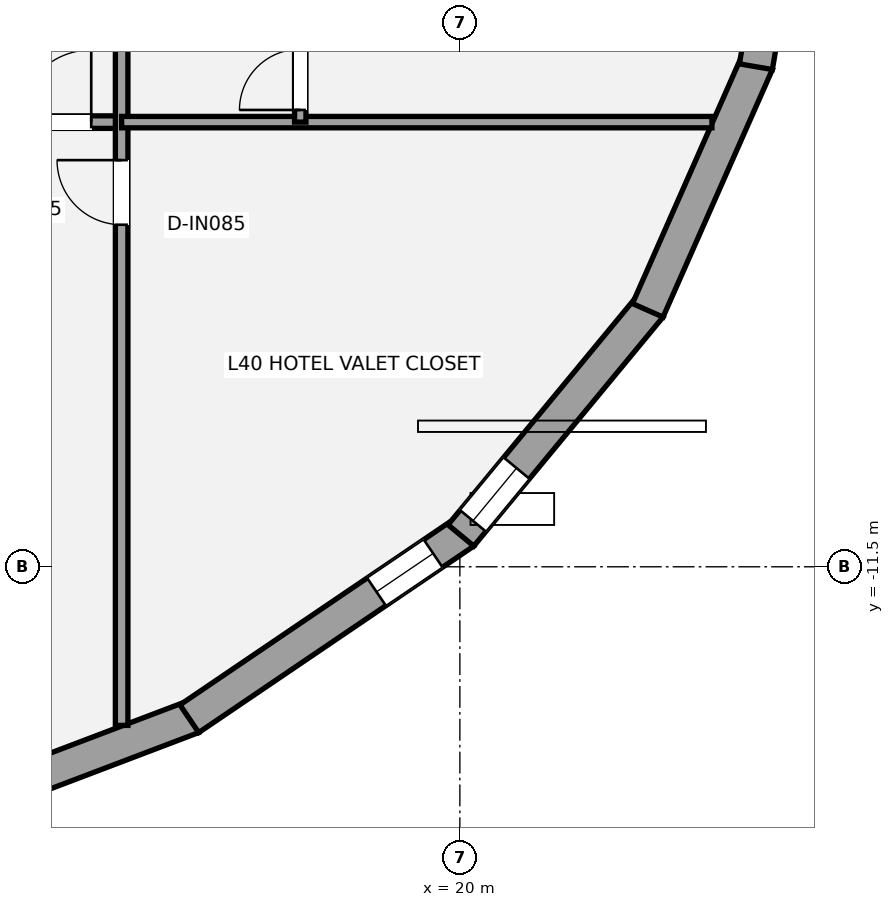
"""IFC4 building model, lengths in metres.
Left out: names, types, materials, properties, quantities, classifications, styles, units other than length and angle.
Written with IfcOpenShell. Run it as: python <this file> out.ifc"""

import sys

from ifc_helpers import new_model, si_unit, direction, frame, frame_2d, origin, place, context, subcontext, project, spatial, rectangle, extrude, element, fill, save


model = new_model("IFC4")
c1 = context("Model", 3, precision=1e-05, world=origin(), true_north=direction((0.0, 1.0)))
c2 = subcontext(c1, "Body", "Model", "MODEL_VIEW")
j1 = project(units=[si_unit("LENGTHUNIT", "METRE"), si_unit("PLANEANGLEUNIT", "RADIAN")], contexts=[c1])
p1 = place(None, origin())
s1 = spatial("IfcSite", under=j1, at=p1, CompositionType="ELEMENT")
p2 = place(p1, origin())
s2 = spatial("IfcBuilding", under=s1, at=p2, CompositionType="ELEMENT")
p3 = place(p2, frame((0.0, 0.0, 150.2)))
s3 = spatial("IfcBuildingStorey", under=s2, at=p3, CompositionType="ELEMENT", Elevation=150.2)
p4 = place(p3, frame((16.486, -13.475, 0.0), z_axis=(0.0, 0.0, 1.0), x_axis=(-0.93488004884, -0.354963792916, 0.0)))
e1 = element("IfcWall", 1, at=p4, inside=s3, PredefinedType="STANDARD", context=c2, shape_type="SweptSolid", body=[
    extrude(rectangle(XDim=4.755, YDim=0.44, at=frame_2d((2.377, 0.0))), origin(), (0.0, 0.0, 1.0), 2.315),
])
p5 = place(p4, frame((3.358, 0.0, 0.58)))
e2 = element("IfcOpeningElement", 2, at=p5, cuts=e1, PredefinedType="OPENING", context=c2, shape_type="SweptSolid", body=[
    extrude(rectangle(XDim=0.9, YDim=1.35, at=frame_2d((0.45, 0.675))), frame((0.0, 0.23, 0.0), z_axis=(0.0, -1.0, 0.0), x_axis=(1.0, 0.0, 0.0)), (0.0, 0.0, 1.0), 0.46),
])
p6 = place(p3, frame((20.06, -11.046, 0.0), z_axis=(0.0, 0.0, 1.0), x_axis=(-0.827782339513, -0.561049372507, 0.0)))
e3 = element("IfcWall", 3, at=p6, inside=s3, PredefinedType="STANDARD", context=c2, shape_type="SweptSolid", body=[
    extrude(rectangle(XDim=4.372, YDim=0.44, at=frame_2d((2.186, 0.0))), origin(), (0.0, 0.0, 1.0), 2.315),
])
p7 = place(p6, frame((0.497, 0.0, 0.58)))
e4 = element("IfcOpeningElement", 4, at=p7, cuts=e3, PredefinedType="OPENING", context=c2, shape_type="SweptSolid", body=[
    extrude(rectangle(XDim=0.9, YDim=1.35, at=frame_2d((0.45, 0.675))), frame((0.0, 0.23, 0.0), z_axis=(0.0, -1.0, 0.0), x_axis=(1.0, 0.0, 0.0)), (0.0, 0.0, 1.0), 0.46),
])
p8 = place(p3, frame((22.504, -8.075, 0.0), z_axis=(0.0, 0.0, 1.0), x_axis=(-0.637002505989, -0.77086173038, 0.0)))
e5 = element("IfcWall", 5, at=p8, inside=s3, PredefinedType="STANDARD", context=c2, shape_type="SweptSolid", body=[
    extrude(rectangle(XDim=3.908, YDim=0.44, at=frame_2d((1.954, 0.0))), origin(), (0.0, 0.0, 1.0), 2.315),
])
p9 = place(p8, frame((2.76, 0.0, 0.42)))
e6 = element("IfcOpeningElement", 6, at=p9, cuts=e5, PredefinedType="OPENING", context=c2, shape_type="SweptSolid", body=[
    extrude(rectangle(XDim=0.9, YDim=1.35, at=frame_2d((0.45, 0.675))), frame((0.0, 0.23, 0.0), z_axis=(0.0, -1.0, 0.0), x_axis=(1.0, 0.0, 0.0)), (0.0, 0.0, 1.0), 0.46),
])
p10 = place(p3, frame((23.911, -4.869, 0.0), z_axis=(0.0, 0.0, 1.0), x_axis=(-0.403999745193, -0.914759097186, 0.0)))
e7 = element("IfcWall", 7, at=p10, inside=s3, PredefinedType="STANDARD", context=c2, shape_type="SweptSolid", body=[
    extrude(rectangle(XDim=3.561, YDim=0.44, at=frame_2d((1.78, 0.0))), origin(), (0.0, 0.0, 1.0), 2.315),
])
p11 = place(p3, frame((24.459, -1.61, 0.0), z_axis=(0.0, 0.0, 1.0), x_axis=(-0.168075929829, -0.985774052109, 0.0)))
e8 = element("IfcWall", 8, at=p11, inside=s3, PredefinedType="STANDARD", context=c2, shape_type="SweptSolid", body=[
    extrude(rectangle(XDim=3.358, YDim=0.44, at=frame_2d((1.679, 0.0))), origin(), (0.0, 0.0, 1.0), 2.315),
])
p12 = place(p11, frame((2.411, 0.0, 0.58)))
e9 = element("IfcOpeningElement", 9, at=p12, cuts=e8, PredefinedType="OPENING", context=c2, shape_type="SweptSolid", body=[
    extrude(rectangle(XDim=0.56, YDim=1.15, at=frame_2d((0.28, 0.575))), frame((0.0, 0.23, 0.0), z_axis=(0.0, -1.0, 0.0), x_axis=(1.0, 0.0, 0.0)), (0.0, 0.0, 1.0), 0.46),
])
p13 = place(p3, frame((-15.55, -5.65, 0.0), z_axis=(0.0, 0.0, 1.0), x_axis=(1.0, 0.0, 0.0)))
e10 = element("IfcWall", 10, at=p13, inside=s3, PredefinedType="PARTITIONING", context=c2, shape_type="SweptSolid", body=[
    extrude(rectangle(XDim=31.1, YDim=0.165, at=frame_2d((15.55, 0.0))), origin(), (0.0, 0.0, 1.0), 2.398),
])
p14 = place(p13, frame((4.6, 0.0, 0.0)))
e11 = element("IfcOpeningElement", 11, at=p14, cuts=e10, PredefinedType="OPENING", context=c2, shape_type="SweptSolid", body=[
    extrude(rectangle(XDim=0.95, YDim=2.15, at=frame_2d((0.475, 1.075))), frame((0.0, 0.093, 0.0), z_axis=(0.0, -1.0, 0.0), x_axis=(1.0, 0.0, 0.0)), (0.0, 0.0, 1.0), 0.185),
])
p15 = place(p13, frame((11.0, 0.0, 0.0)))
e12 = element("IfcOpeningElement", 12, at=p15, cuts=e10, PredefinedType="OPENING", context=c2, shape_type="SweptSolid", body=[
    extrude(rectangle(XDim=0.95, YDim=2.15, at=frame_2d((0.475, 1.075))), frame((0.0, 0.093, 0.0), z_axis=(0.0, -1.0, 0.0), x_axis=(1.0, 0.0, 0.0)), (0.0, 0.0, 1.0), 0.185),
])
p16 = place(p13, frame((17.4, 0.0, 0.0)))
e13 = element("IfcOpeningElement", 13, at=p16, cuts=e10, PredefinedType="OPENING", context=c2, shape_type="SweptSolid", body=[
    extrude(rectangle(XDim=0.95, YDim=2.15, at=frame_2d((0.475, 1.075))), frame((0.0, 0.093, 0.0), z_axis=(0.0, -1.0, 0.0), x_axis=(1.0, 0.0, 0.0)), (0.0, 0.0, 1.0), 0.185),
])
p17 = place(p13, frame((23.8, 0.0, 0.0)))
e14 = element("IfcOpeningElement", 14, at=p17, cuts=e10, PredefinedType="OPENING", context=c2, shape_type="SweptSolid", body=[
    extrude(rectangle(XDim=0.95, YDim=2.15, at=frame_2d((0.475, 1.075))), frame((0.0, 0.093, 0.0), z_axis=(0.0, -1.0, 0.0), x_axis=(1.0, 0.0, 0.0)), (0.0, 0.0, 1.0), 0.185),
])
p18 = place(p13, frame((29.75, 0.0, 0.0)))
e15 = element("IfcOpeningElement", 15, at=p18, cuts=e10, PredefinedType="OPENING", context=c2, shape_type="SweptSolid", body=[
    extrude(rectangle(XDim=0.95, YDim=2.15, at=frame_2d((0.475, 1.075))), frame((0.0, 0.093, 0.0), z_axis=(0.0, -1.0, 0.0), x_axis=(1.0, 0.0, 0.0)), (0.0, 0.0, 1.0), 0.185),
])
p19 = place(p3, frame((15.55, -13.587, 0.0), z_axis=(0.0, 0.0, 1.0), x_axis=(0.0, 1.0, 0.0)))
e16 = element("IfcWall", 16, at=p19, inside=s3, PredefinedType="PARTITIONING", context=c2, shape_type="SweptSolid", body=[
    extrude(rectangle(XDim=21.137, YDim=0.165, at=frame_2d((10.568, 0.0))), origin(), (0.0, 0.0, 1.0), 2.473),
])
p20 = place(p19, frame((6.587, 0.0, 0.0)))
e17 = element("IfcOpeningElement", 17, at=p20, cuts=e16, PredefinedType="OPENING", context=c2, shape_type="SweptSolid", body=[
    extrude(rectangle(XDim=0.85, YDim=2.1, at=frame_2d((0.425, 1.05))), frame((0.0, 0.093, 0.0), z_axis=(0.0, -1.0, 0.0), x_axis=(1.0, 0.0, 0.0)), (0.0, 0.0, 1.0), 0.185),
])
p21 = place(p19, frame((10.637, 0.0, 0.0)))
e18 = element("IfcOpeningElement", 18, at=p21, cuts=e16, PredefinedType="OPENING", context=c2, shape_type="SweptSolid", body=[
    extrude(rectangle(XDim=0.95, YDim=2.15, at=frame_2d((0.475, 1.075))), frame((0.0, 0.093, 0.0), z_axis=(0.0, -1.0, 0.0), x_axis=(1.0, 0.0, 0.0)), (0.0, 0.0, 1.0), 0.185),
])
p22 = place(p19, frame((15.037, 0.0, 0.0)))
e19 = element("IfcOpeningElement", 19, at=p22, cuts=e16, PredefinedType="OPENING", context=c2, shape_type="SweptSolid", body=[
    extrude(rectangle(XDim=0.95, YDim=2.15, at=frame_2d((0.475, 1.075))), frame((0.0, 0.093, 0.0), z_axis=(0.0, -1.0, 0.0), x_axis=(1.0, 0.0, 0.0)), (0.0, 0.0, 1.0), 0.185),
])
p23 = place(p19, frame((19.787, 0.0, 0.0)))
e20 = element("IfcOpeningElement", 20, at=p23, cuts=e16, PredefinedType="OPENING", context=c2, shape_type="SweptSolid", body=[
    extrude(rectangle(XDim=0.95, YDim=2.15, at=frame_2d((0.475, 1.075))), frame((0.0, 0.093, 0.0), z_axis=(0.0, -1.0, 0.0), x_axis=(1.0, 0.0, 0.0)), (0.0, 0.0, 1.0), 0.185),
])
p24 = place(p3, frame((15.55, -5.65, 0.0), z_axis=(0.0, 0.0, 1.0), x_axis=(1.0, 0.0, 0.0)))
e21 = element("IfcWall", 21, at=p24, inside=s3, PredefinedType="PLUMBINGWALL", context=c2, shape_type="SweptSolid", body=[
    extrude(rectangle(XDim=7.766, YDim=0.15, at=frame_2d((3.883, 0.0))), origin(), (0.0, 0.0, 1.0), 2.473),
])
p25 = place(p3, frame((17.9, -5.65, 0.0), z_axis=(0.0, 0.0, 1.0), x_axis=(0.0, 1.0, 0.0)))
e22 = element("IfcWall", 22, at=p25, inside=s3, PredefinedType="PLUMBINGWALL", context=c2, shape_type="SweptSolid", body=[
    extrude(rectangle(XDim=2.15, YDim=0.15, at=frame_2d((1.075, 0.0))), origin(), (0.0, 0.0, 1.0), 2.473),
])
p26 = place(p25, frame((0.16, 0.0, 0.0)))
e23 = element("IfcOpeningElement", 23, at=p26, cuts=e22, PredefinedType="OPENING", context=c2, shape_type="SweptSolid", body=[
    extrude(rectangle(XDim=0.8, YDim=2.1, at=frame_2d((0.4, 1.05))), frame((0.0, 0.085, 0.0), z_axis=(0.0, -1.0, 0.0), x_axis=(1.0, 0.0, 0.0)), (0.0, 0.0, 1.0), 0.17),
])
p27 = place(p7, origin())
e24 = element("IfcWindow", 24, at=p27, inside=s3, PartitioningType="SINGLE_PANEL", PredefinedType="WINDOW", context=c2, shape_type="SweptSolid", body=[
    extrude(rectangle(XDim=0.9, YDim=1.35, at=frame_2d((0.45, 0.675))), frame((0.0, -0.01, 0.0), z_axis=(0.0, -1.0, 0.0), x_axis=(1.0, 0.0, 0.0)), (0.0, 0.0, 1.0), 0.06),
])
fill(e4, e24)
p28 = place(p9, origin())
e25 = element("IfcWindow", 25, at=p28, inside=s3, PartitioningType="SINGLE_PANEL", PredefinedType="WINDOW", context=c2, shape_type="SweptSolid", body=[
    extrude(rectangle(XDim=0.9, YDim=1.35, at=frame_2d((0.45, 0.675))), frame((0.0, -0.01, 0.0), z_axis=(0.0, -1.0, 0.0), x_axis=(1.0, 0.0, 0.0)), (0.0, 0.0, 1.0), 0.06),
])
fill(e6, e25)
p29 = place(p20, origin())
e26 = element("IfcDoor", 26, at=p29, inside=s3, OperationType="SINGLE_SWING_RIGHT", PredefinedType="DOOR", context=c2, shape_type="SweptSolid", body=[
    extrude(rectangle(XDim=0.85, YDim=2.1, at=frame_2d((0.425, 1.05))), frame((0.0, 0.025, 0.0), z_axis=(0.0, -1.0, 0.0), x_axis=(1.0, 0.0, 0.0)), (0.0, 0.0, 1.0), 0.05),
])
fill(e17, e26)
p30 = place(p18, origin())
e27 = element("IfcDoor", 27, at=p30, inside=s3, OperationType="SINGLE_SWING_RIGHT", PredefinedType="DOOR", context=c2, shape_type="SweptSolid", body=[
    extrude(rectangle(XDim=0.95, YDim=2.15, at=frame_2d((0.475, 1.075))), frame((0.0, 0.025, 0.0), z_axis=(0.0, -1.0, 0.0), x_axis=(1.0, 0.0, 0.0)), (0.0, 0.0, 1.0), 0.05),
])
fill(e15, e27)
p31 = place(p26, origin())
e28 = element("IfcDoor", 28, at=p31, inside=s3, OperationType="SINGLE_SWING_LEFT", PredefinedType="DOOR", context=c2, shape_type="SweptSolid", body=[
    extrude(rectangle(XDim=0.8, YDim=2.1, at=frame_2d((0.4, 1.05))), frame((0.0, 0.025, 0.0), z_axis=(0.0, -1.0, 0.0), x_axis=(1.0, 0.0, 0.0)), (0.0, 0.0, 1.0), 0.05),
])
fill(e23, e28)
save(model, sys.argv[1])
